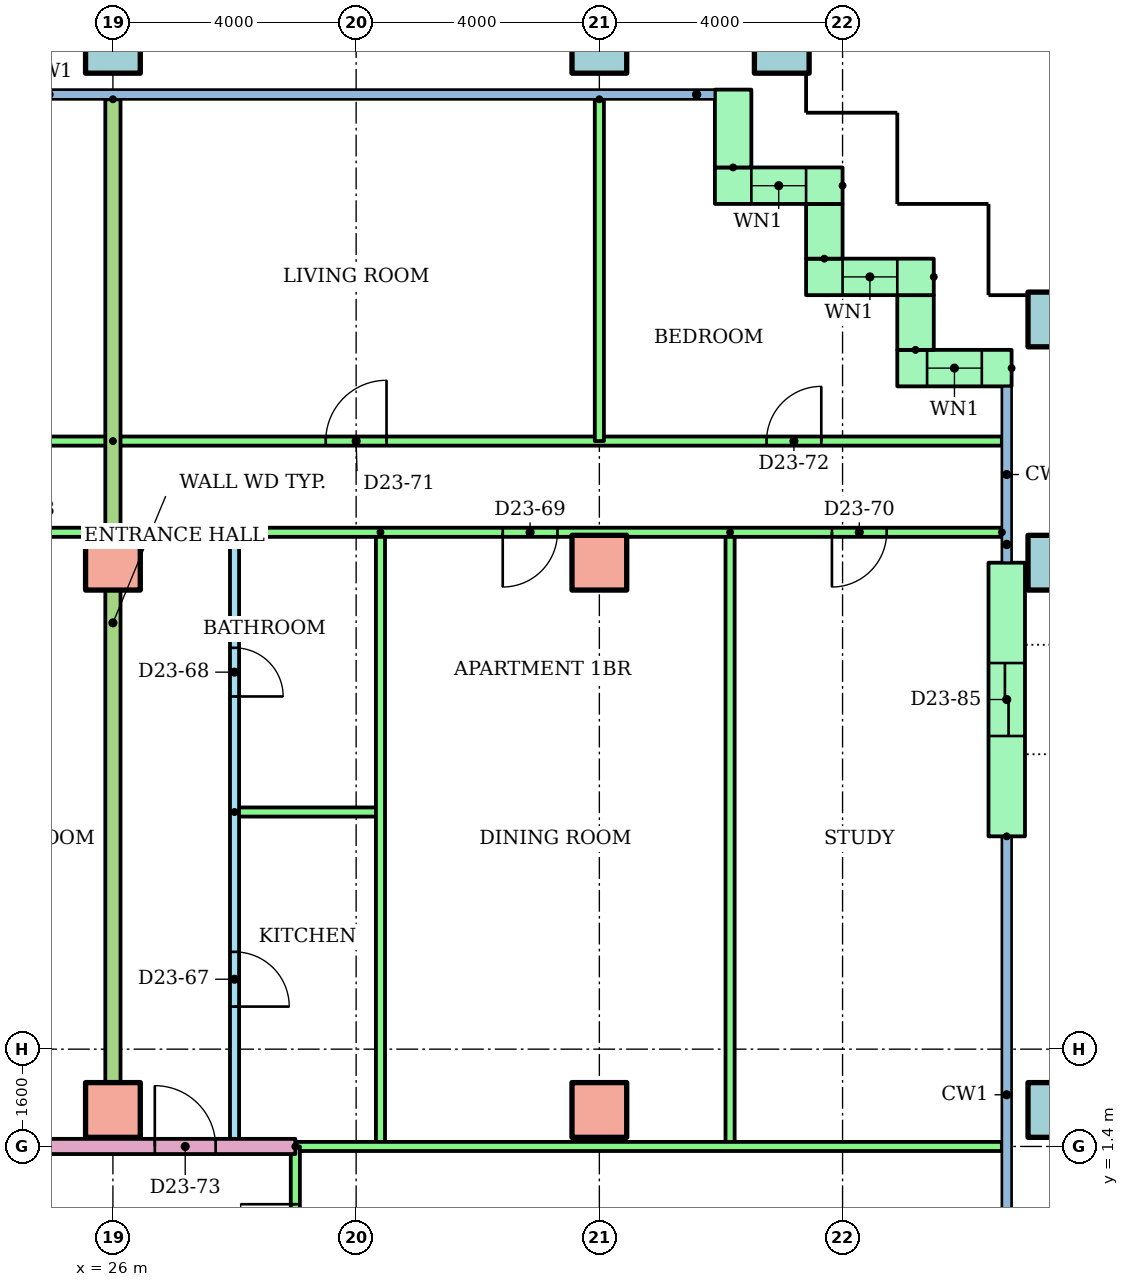
"""IFC4 building model, lengths in metres.
Left out: names, types, materials, properties, quantities, classifications, styles, units other than length and angle.
Written with IfcOpenShell. Run it as: python <this file> out.ifc"""

import sys

from ifc_helpers import new_model, si_unit, direction, frame, frame_2d, origin, origin_2d, place, context, subcontext, project, spatial, rectangle, hollow_rectangle, extrude, element, fill, save


model = new_model("IFC4")
c1 = context("Model", 3, precision=1e-05, world=origin(), true_north=direction((0.0, 1.0)))
c2 = subcontext(c1, "Body", "Model", "MODEL_VIEW")
j1 = project(units=[si_unit("LENGTHUNIT", "METRE"), si_unit("PLANEANGLEUNIT", "RADIAN")], contexts=[c1])
p1 = place(None, origin())
s1 = spatial("IfcSite", under=j1, at=p1, CompositionType="ELEMENT")
p2 = place(p1, origin())
s2 = spatial("IfcBuilding", under=s1, at=p2, CompositionType="ELEMENT")
p3 = place(p2, frame((0.0, 0.0, 90.3)))
s3 = spatial("IfcBuildingStorey", under=s2, at=p3, CompositionType="ELEMENT", Elevation=90.3)
for number, where in (
    (1, (26.0, 2.0, 0.0)),
    (2, (34.0, 2.0, 0.0)),
):
    element("IfcColumn", number, at=place(p3, frame(where)), inside=s3, PredefinedType="COLUMN", context=c2, shape_type="SweptSolid", body=[
        extrude(rectangle(XDim=0.9, YDim=0.9, at=origin_2d()), origin(), (0.0, 0.0, 1.0), 3.2),
    ])
p4 = place(p3, frame((41.5, 2.0, 0.0)))
e3 = element("IfcColumn", 3, at=p4, inside=s3, PredefinedType="COLUMN", context=c2, shape_type="SweptSolid", body=[
    extrude(hollow_rectangle(XDim=0.9, YDim=0.9, WallThickness=0.045, at=origin_2d()), origin(), (0.0, 0.0, 1.0), 3.2),
])
for number, where in (
    (4, (26.0, 11.0, 0.0)),
    (5, (34.0, 11.0, 0.0)),
):
    element("IfcColumn", number, at=place(p3, frame(where)), inside=s3, PredefinedType="COLUMN", context=c2, shape_type="SweptSolid", body=[
        extrude(rectangle(XDim=0.9, YDim=0.9, at=origin_2d()), origin(), (0.0, 0.0, 1.0), 3.2),
    ])
for number, where in (
    (6, (41.5, 11.0, 0.0)),
    (7, (41.5, 15.0, 0.0)),
    (8, (26.0, 19.5, 0.0)),
    (9, (34.0, 19.5, 0.0)),
    (10, (37.0, 19.5, 0.0)),
):
    element("IfcColumn", number, at=place(p3, frame(where)), inside=s3, PredefinedType="COLUMN", context=c2, shape_type="SweptSolid", body=[
        extrude(hollow_rectangle(XDim=0.9, YDim=0.9, WallThickness=0.045, at=origin_2d()), origin(), (0.0, 0.0, 1.0), 3.2),
    ])
p5 = place(p3, frame((40.78, 14.2, 0.0), z_axis=(0.0, 0.0, 1.0), x_axis=(-1.0, 0.0, 0.0)))
e11 = element("IfcWall", 11, at=p5, inside=s3, PredefinedType="STANDARD", context=c2, shape_type="SweptSolid", body=[
    extrude(rectangle(XDim=1.88, YDim=0.6, at=frame_2d((0.94, 0.0))), origin(), (0.0, 0.0, 1.0), 2.92),
])
p6 = place(p5, frame((0.49, 0.0, 0.9)))
e12 = element("IfcOpeningElement", 12, at=p6, cuts=e11, PredefinedType="OPENING", context=c2, shape_type="SweptSolid", body=[
    extrude(rectangle(XDim=0.9, YDim=1.5, at=frame_2d((0.45, 0.75))), frame((0.0, 0.31, 0.0), z_axis=(0.0, -1.0, 0.0), x_axis=(1.0, 0.0, 0.0)), (0.0, 0.0, 1.0), 0.62),
])
p7 = place(p3, frame((39.2, 14.5, 0.0), z_axis=(0.0, 0.0, 1.0), x_axis=(0.0, 1.0, 0.0)))
e13 = element("IfcWall", 13, at=p7, inside=s3, PredefinedType="STANDARD", context=c2, shape_type="SweptSolid", body=[
    extrude(rectangle(XDim=0.9, YDim=0.6, at=frame_2d((0.45, 0.0))), origin(), (0.0, 0.0, 1.0), 2.92),
])
p8 = place(p3, frame((39.5, 15.7, 0.0), z_axis=(0.0, 0.0, 1.0), x_axis=(-1.0, 0.0, 0.0)))
e14 = element("IfcWall", 14, at=p8, inside=s3, PredefinedType="STANDARD", context=c2, shape_type="SweptSolid", body=[
    extrude(rectangle(XDim=2.1, YDim=0.6, at=frame_2d((1.05, 0.0))), origin(), (0.0, 0.0, 1.0), 2.92),
])
p9 = place(p8, frame((0.6, 0.0, 0.9)))
e15 = element("IfcOpeningElement", 15, at=p9, cuts=e14, PredefinedType="OPENING", context=c2, shape_type="SweptSolid", body=[
    extrude(rectangle(XDim=0.9, YDim=1.5, at=frame_2d((0.45, 0.75))), frame((0.0, 0.31, 0.0), z_axis=(0.0, -1.0, 0.0), x_axis=(1.0, 0.0, 0.0)), (0.0, 0.0, 1.0), 0.62),
])
p10 = place(p3, frame((37.7, 16.0, 0.0), z_axis=(0.0, 0.0, 1.0), x_axis=(0.0, 1.0, 0.0)))
e16 = element("IfcWall", 16, at=p10, inside=s3, PredefinedType="STANDARD", context=c2, shape_type="SweptSolid", body=[
    extrude(rectangle(XDim=0.9, YDim=0.6, at=frame_2d((0.45, 0.0))), origin(), (0.0, 0.0, 1.0), 2.92),
])
p11 = place(p3, frame((38.0, 17.2, 0.0), z_axis=(0.0, 0.0, 1.0), x_axis=(-1.0, 0.0, 0.0)))
e17 = element("IfcWall", 17, at=p11, inside=s3, PredefinedType="STANDARD", context=c2, shape_type="SweptSolid", body=[
    extrude(rectangle(XDim=2.1, YDim=0.6, at=frame_2d((1.05, 0.0))), origin(), (0.0, 0.0, 1.0), 2.92),
])
p12 = place(p11, frame((0.6, 0.0, 0.9)))
e18 = element("IfcOpeningElement", 18, at=p12, cuts=e17, PredefinedType="OPENING", context=c2, shape_type="SweptSolid", body=[
    extrude(rectangle(XDim=0.9, YDim=1.5, at=frame_2d((0.45, 0.75))), frame((0.0, 0.31, 0.0), z_axis=(0.0, -1.0, 0.0), x_axis=(1.0, 0.0, 0.0)), (0.0, 0.0, 1.0), 0.62),
])
p13 = place(p3, frame((36.2, 17.5, 0.0), z_axis=(0.0, 0.0, 1.0), x_axis=(0.0, 1.0, 0.0)))
e19 = element("IfcWall", 19, at=p13, inside=s3, PredefinedType="STANDARD", context=c2, shape_type="SweptSolid", body=[
    extrude(rectangle(XDim=1.28, YDim=0.6, at=frame_2d((0.64, 0.0))), origin(), (0.0, 0.0, 1.0), 2.92),
])
p14 = place(p3, frame((40.7, 6.5, 0.0), z_axis=(0.0, 0.0, 1.0), x_axis=(0.0, 1.0, 0.0)))
e20 = element("IfcWall", 20, at=p14, inside=s3, PredefinedType="STANDARD", context=c2, shape_type="SweptSolid", body=[
    extrude(rectangle(XDim=4.5, YDim=0.6, at=frame_2d((2.25, 0.0))), origin(), (0.0, 0.0, 1.0), 2.92),
])
p15 = place(p14, frame((1.65, 0.0, 0.0)))
e21 = element("IfcOpeningElement", 21, at=p15, cuts=e20, PredefinedType="OPENING", context=c2, shape_type="SweptSolid", body=[
    extrude(rectangle(XDim=1.2, YDim=2.1, at=frame_2d((0.6, 1.05))), frame((0.0, 0.31, 0.0), z_axis=(0.0, -1.0, 0.0), x_axis=(1.0, 0.0, 0.0)), (0.0, 0.0, 1.0), 0.62),
])
p16 = place(p3, frame((26.0, 11.5, 0.0), z_axis=(0.0, 0.0, 1.0), x_axis=(-1.0, 0.0, 0.0)))
e22 = element("IfcWall", 22, at=p16, inside=s3, PredefinedType="PARTITIONING", context=c2, shape_type="SweptSolid", body=[
    extrude(rectangle(XDim=10.0, YDim=0.15, at=frame_2d((5.0, 0.0))), origin(), (0.0, 0.0, 1.0), 2.4),
])
p17 = place(p16, frame((4.9, 0.0, 0.0)))
e23 = element("IfcOpeningElement", 23, at=p17, cuts=e22, PredefinedType="OPENING", context=c2, shape_type="SweptSolid", body=[
    extrude(rectangle(XDim=0.9, YDim=2.1, at=frame_2d((0.45, 1.05))), frame((0.0, 0.085, 0.0), z_axis=(0.0, -1.0, 0.0), x_axis=(1.0, 0.0, 0.0)), (0.0, 0.0, 1.0), 0.17),
])
p18 = place(p16, frame((1.1, 0.0, 0.0)))
e24 = element("IfcOpeningElement", 24, at=p18, cuts=e22, PredefinedType="OPENING", context=c2, shape_type="SweptSolid", body=[
    extrude(rectangle(XDim=0.9, YDim=2.1, at=frame_2d((0.45, 1.05))), frame((0.0, 0.085, 0.0), z_axis=(0.0, -1.0, 0.0), x_axis=(1.0, 0.0, 0.0)), (0.0, 0.0, 1.0), 0.17),
])
p19 = place(p3, frame((14.0, 13.0, 0.0)))
e25 = element("IfcWall", 25, at=p19, inside=s3, PredefinedType="PARTITIONING", context=c2, shape_type="SweptSolid", body=[
    extrude(rectangle(XDim=12.0, YDim=0.15, at=frame_2d((6.0, 0.0))), origin(), (0.0, 0.0, 1.0), 2.4),
])
p20 = place(p19, frame((1.5, 0.0, 0.0)))
e26 = element("IfcOpeningElement", 26, at=p20, cuts=e25, PredefinedType="OPENING", context=c2, shape_type="SweptSolid", body=[
    extrude(rectangle(XDim=1.0, YDim=2.1, at=frame_2d((0.5, 1.05))), frame((0.0, 0.085, 0.0), z_axis=(0.0, -1.0, 0.0), x_axis=(1.0, 0.0, 0.0)), (0.0, 0.0, 1.0), 0.17),
])
p21 = place(p19, frame((7.55, 0.0, 0.0)))
e27 = element("IfcOpeningElement", 27, at=p21, cuts=e25, PredefinedType="OPENING", context=c2, shape_type="SweptSolid", body=[
    extrude(rectangle(XDim=0.9, YDim=2.1, at=frame_2d((0.45, 1.05))), frame((0.0, 0.085, 0.0), z_axis=(0.0, -1.0, 0.0), x_axis=(1.0, 0.0, 0.0)), (0.0, 0.0, 1.0), 0.17),
])
p22 = place(p3, frame((28.0, 11.5, 0.0), z_axis=(0.0, 0.0, 1.0), x_axis=(0.0, -1.0, 0.0)))
e28 = element("IfcWall", 28, at=p22, inside=s3, PredefinedType="PARTITIONING", context=c2, shape_type="SweptSolid", body=[
    extrude(rectangle(XDim=10.1, YDim=0.15, at=frame_2d((5.05, 0.0))), origin(), (0.0, 0.0, 1.0), 2.4),
])
p23 = place(p22, frame((6.9, 0.0, 0.0)))
e29 = element("IfcOpeningElement", 29, at=p23, cuts=e28, PredefinedType="OPENING", context=c2, shape_type="SweptSolid", body=[
    extrude(rectangle(XDim=0.9, YDim=2.1, at=frame_2d((0.45, 1.05))), frame((0.0, 0.085, 0.0), z_axis=(0.0, -1.0, 0.0), x_axis=(1.0, 0.0, 0.0)), (0.0, 0.0, 1.0), 0.17),
])
p24 = place(p22, frame((1.9, 0.0, 0.0)))
e30 = element("IfcOpeningElement", 30, at=p24, cuts=e28, PredefinedType="OPENING", context=c2, shape_type="SweptSolid", body=[
    extrude(rectangle(XDim=0.8, YDim=2.1, at=frame_2d((0.4, 1.05))), frame((0.0, 0.085, 0.0), z_axis=(0.0, -1.0, 0.0), x_axis=(1.0, 0.0, 0.0)), (0.0, 0.0, 1.0), 0.17),
])
p25 = place(p3, frame((28.0, 6.9, 0.0)))
e31 = element("IfcWall", 31, at=p25, inside=s3, PredefinedType="PARTITIONING", context=c2, shape_type="SweptSolid", body=[
    extrude(rectangle(XDim=2.4, YDim=0.15, at=frame_2d((1.2, 0.0))), origin(), (0.0, 0.0, 1.0), 2.4),
])
for number, where, z_axis, x_axis in (
    (32, (30.4, 11.5, 0.0), (0.0, 0.0, 1.0), (0.0, -1.0, 0.0)),
    (33, (36.15, 11.5, 0.0), (0.0, 0.0, 1.0), (0.0, -1.0, 0.0)),
):
    element("IfcWall", number, at=place(p3, frame(where, z_axis=z_axis, x_axis=x_axis)), inside=s3, PredefinedType="PARTITIONING", context=c2, shape_type="SweptSolid", body=[
        extrude(rectangle(XDim=10.1, YDim=0.15, at=frame_2d((5.05, 0.0))), origin(), (0.0, 0.0, 1.0), 2.4),
    ])
p26 = place(p3, frame((40.62, 11.5, 0.0), z_axis=(0.0, 0.0, 1.0), x_axis=(-1.0, 0.0, 0.0)))
e34 = element("IfcWall", 34, at=p26, inside=s3, PredefinedType="PARTITIONING", context=c2, shape_type="SweptSolid", body=[
    extrude(rectangle(XDim=12.62, YDim=0.15, at=frame_2d((6.31, 0.0))), origin(), (0.0, 0.0, 1.0), 2.4),
])
p27 = place(p26, frame((7.309, 0.0, 0.0)))
e35 = element("IfcOpeningElement", 35, at=p27, cuts=e34, PredefinedType="OPENING", context=c2, shape_type="SweptSolid", body=[
    extrude(rectangle(XDim=0.9, YDim=2.1, at=frame_2d((0.45, 1.05))), frame((0.0, 0.085, 0.0), z_axis=(0.0, -1.0, 0.0), x_axis=(1.0, 0.0, 0.0)), (0.0, 0.0, 1.0), 0.17),
])
p28 = place(p26, frame((1.895, 0.0, 0.0)))
e36 = element("IfcOpeningElement", 36, at=p28, cuts=e34, PredefinedType="OPENING", context=c2, shape_type="SweptSolid", body=[
    extrude(rectangle(XDim=0.9, YDim=2.1, at=frame_2d((0.45, 1.05))), frame((0.0, 0.085, 0.0), z_axis=(0.0, -1.0, 0.0), x_axis=(1.0, 0.0, 0.0)), (0.0, 0.0, 1.0), 0.17),
])
p29 = place(p3, frame((26.0, 13.0, 0.0)))
e37 = element("IfcWall", 37, at=p29, inside=s3, PredefinedType="PARTITIONING", context=c2, shape_type="SweptSolid", body=[
    extrude(rectangle(XDim=14.62, YDim=0.15, at=frame_2d((7.31, 0.0))), origin(), (0.0, 0.0, 1.0), 2.4),
])
p30 = place(p29, frame((3.5, 0.0, 0.0)))
e38 = element("IfcOpeningElement", 38, at=p30, cuts=e37, PredefinedType="OPENING", context=c2, shape_type="SweptSolid", body=[
    extrude(rectangle(XDim=1.0, YDim=2.1, at=frame_2d((0.5, 1.05))), frame((0.0, 0.085, 0.0), z_axis=(0.0, -1.0, 0.0), x_axis=(1.0, 0.0, 0.0)), (0.0, 0.0, 1.0), 0.17),
])
p31 = place(p29, frame((10.75, 0.0, 0.0)))
e39 = element("IfcOpeningElement", 39, at=p31, cuts=e37, PredefinedType="OPENING", context=c2, shape_type="SweptSolid", body=[
    extrude(rectangle(XDim=0.9, YDim=2.1, at=frame_2d((0.45, 1.05))), frame((0.0, 0.085, 0.0), z_axis=(0.0, -1.0, 0.0), x_axis=(1.0, 0.0, 0.0)), (0.0, 0.0, 1.0), 0.17),
])
p32 = place(p3, frame((34.0, 18.621, 0.0), z_axis=(0.0, 0.0, 1.0), x_axis=(0.0, -1.0, 0.0)))
e40 = element("IfcWall", 40, at=p32, inside=s3, PredefinedType="PARTITIONING", context=c2, shape_type="SweptSolid", body=[
    extrude(rectangle(XDim=5.621, YDim=0.15, at=frame_2d((2.811, 0.0))), origin(), (0.0, 0.0, 1.0), 2.4),
])
p33 = place(p3, frame((26.0, 18.621, 0.0), z_axis=(0.0, 0.0, 1.0), x_axis=(0.0, -1.0, 0.0)))
e41 = element("IfcWall", 41, at=p33, inside=s3, PredefinedType="PARTITIONING", context=c2, shape_type="SweptSolid", body=[
    extrude(rectangle(XDim=17.221, YDim=0.25, at=frame_2d((8.611, 0.0))), origin(), (0.0, 0.0, 1.0), 2.4),
])
p34 = place(p3, frame((14.0, 1.4, 0.0)))
e42 = element("IfcWall", 42, at=p34, inside=s3, PredefinedType="PARTITIONING", context=c2, shape_type="SweptSolid", body=[
    extrude(rectangle(XDim=15.0, YDim=0.25, at=frame_2d((7.5, 0.0))), origin(), (0.0, 0.0, 1.0), 2.4),
])
p35 = place(p34, frame((0.5, 0.0, 0.0)))
e43 = element("IfcOpeningElement", 43, at=p35, cuts=e42, PredefinedType="OPENING", context=c2, shape_type="SweptSolid", body=[
    extrude(rectangle(XDim=1.0, YDim=2.1, at=frame_2d((0.5, 1.05))), frame((0.0, 0.135, 0.0), z_axis=(0.0, -1.0, 0.0), x_axis=(1.0, 0.0, 0.0)), (0.0, 0.0, 1.0), 0.27),
])
p36 = place(p34, frame((12.689, 0.0, 0.0)))
e44 = element("IfcOpeningElement", 44, at=p36, cuts=e42, PredefinedType="OPENING", context=c2, shape_type="SweptSolid", body=[
    extrude(rectangle(XDim=1.0, YDim=2.1, at=frame_2d((0.5, 1.05))), frame((0.0, 0.135, 0.0), z_axis=(0.0, -1.0, 0.0), x_axis=(1.0, 0.0, 0.0)), (0.0, 0.0, 1.0), 0.27),
])
p37 = place(p3, frame((29.0, 1.4, 0.0)))
e45 = element("IfcWall", 45, at=p37, inside=s3, PredefinedType="PARTITIONING", context=c2, shape_type="SweptSolid", body=[
    extrude(rectangle(XDim=11.62, YDim=0.15, at=frame_2d((5.81, 0.0))), origin(), (0.0, 0.0, 1.0), 2.4),
])
p38 = place(p3, frame((29.0, -1.4, 0.0), z_axis=(0.0, 0.0, 1.0), x_axis=(0.0, 1.0, 0.0)))
e46 = element("IfcWall", 46, at=p38, inside=s3, PredefinedType="PARTITIONING", context=c2, shape_type="SweptSolid", body=[
    extrude(rectangle(XDim=2.8, YDim=0.15, at=frame_2d((1.4, 0.0))), origin(), (0.0, 0.0, 1.0), 2.4),
])
p39 = place(p38, frame((0.95, 0.0, 0.0)))
e47 = element("IfcOpeningElement", 47, at=p39, cuts=e46, PredefinedType="OPENING", context=c2, shape_type="SweptSolid", body=[
    extrude(rectangle(XDim=0.9, YDim=2.1, at=frame_2d((0.45, 1.05))), frame((0.0, 0.085, 0.0), z_axis=(0.0, -1.0, 0.0), x_axis=(1.0, 0.0, 0.0)), (0.0, 0.0, 1.0), 0.17),
])
p40 = place(p6, origin())
e48 = element("IfcWindow", 48, at=p40, inside=s3, PartitioningType="SINGLE_PANEL", PredefinedType="WINDOW", context=c2, shape_type="SweptSolid", body=[
    extrude(rectangle(XDim=0.9, YDim=1.5, at=frame_2d((0.45, 0.75))), frame((0.0, 0.03, 0.0), z_axis=(0.0, -1.0, 0.0), x_axis=(1.0, 0.0, 0.0)), (0.0, 0.0, 1.0), 0.06),
])
fill(e12, e48)
p41 = place(p9, origin())
e49 = element("IfcWindow", 49, at=p41, inside=s3, PartitioningType="SINGLE_PANEL", PredefinedType="WINDOW", context=c2, shape_type="SweptSolid", body=[
    extrude(rectangle(XDim=0.9, YDim=1.5, at=frame_2d((0.45, 0.75))), frame((0.0, 0.03, 0.0), z_axis=(0.0, -1.0, 0.0), x_axis=(1.0, 0.0, 0.0)), (0.0, 0.0, 1.0), 0.06),
])
fill(e15, e49)
p42 = place(p12, origin())
e50 = element("IfcWindow", 50, at=p42, inside=s3, PartitioningType="SINGLE_PANEL", PredefinedType="WINDOW", context=c2, shape_type="SweptSolid", body=[
    extrude(rectangle(XDim=0.9, YDim=1.5, at=frame_2d((0.45, 0.75))), frame((0.0, 0.03, 0.0), z_axis=(0.0, -1.0, 0.0), x_axis=(1.0, 0.0, 0.0)), (0.0, 0.0, 1.0), 0.06),
])
fill(e18, e50)
p43 = place(p23, origin())
e51 = element("IfcDoor", 51, at=p43, inside=s3, OperationType="SINGLE_SWING_RIGHT", PredefinedType="DOOR", context=c2, shape_type="SweptSolid", body=[
    extrude(rectangle(XDim=0.9, YDim=2.1, at=frame_2d((0.45, 1.05))), frame((0.0, 0.025, 0.0), z_axis=(0.0, -1.0, 0.0), x_axis=(1.0, 0.0, 0.0)), (0.0, 0.0, 1.0), 0.05),
])
fill(e29, e51)
p44 = place(p24, origin())
e52 = element("IfcDoor", 52, at=p44, inside=s3, OperationType="SINGLE_SWING_RIGHT", PredefinedType="DOOR", context=c2, shape_type="SweptSolid", body=[
    extrude(rectangle(XDim=0.8, YDim=2.1, at=frame_2d((0.4, 1.05))), frame((0.0, 0.025, 0.0), z_axis=(0.0, -1.0, 0.0), x_axis=(1.0, 0.0, 0.0)), (0.0, 0.0, 1.0), 0.05),
])
fill(e30, e52)
p45 = place(p27, origin())
e53 = element("IfcDoor", 53, at=p45, inside=s3, OperationType="SINGLE_SWING_RIGHT", PredefinedType="DOOR", context=c2, shape_type="SweptSolid", body=[
    extrude(rectangle(XDim=0.9, YDim=2.1, at=frame_2d((0.45, 1.05))), frame((0.0, 0.025, 0.0), z_axis=(0.0, -1.0, 0.0), x_axis=(1.0, 0.0, 0.0)), (0.0, 0.0, 1.0), 0.05),
])
fill(e35, e53)
p46 = place(p28, origin())
e54 = element("IfcDoor", 54, at=p46, inside=s3, OperationType="SINGLE_SWING_RIGHT", PredefinedType="DOOR", context=c2, shape_type="SweptSolid", body=[
    extrude(rectangle(XDim=0.9, YDim=2.1, at=frame_2d((0.45, 1.05))), frame((0.0, 0.025, 0.0), z_axis=(0.0, -1.0, 0.0), x_axis=(1.0, 0.0, 0.0)), (0.0, 0.0, 1.0), 0.05),
])
fill(e36, e54)
p47 = place(p30, origin())
e55 = element("IfcDoor", 55, at=p47, inside=s3, OperationType="SINGLE_SWING_RIGHT", PredefinedType="DOOR", context=c2, shape_type="SweptSolid", body=[
    extrude(rectangle(XDim=1.0, YDim=2.1, at=frame_2d((0.5, 1.05))), frame((0.0, 0.025, 0.0), z_axis=(0.0, -1.0, 0.0), x_axis=(1.0, 0.0, 0.0)), (0.0, 0.0, 1.0), 0.05),
])
fill(e38, e55)
p48 = place(p31, origin())
e56 = element("IfcDoor", 56, at=p48, inside=s3, OperationType="SINGLE_SWING_RIGHT", PredefinedType="DOOR", context=c2, shape_type="SweptSolid", body=[
    extrude(rectangle(XDim=0.9, YDim=2.1, at=frame_2d((0.45, 1.05))), frame((0.0, 0.025, 0.0), z_axis=(0.0, -1.0, 0.0), x_axis=(1.0, 0.0, 0.0)), (0.0, 0.0, 1.0), 0.05),
])
fill(e39, e56)
p49 = place(p36, origin())
e57 = element("IfcDoor", 57, at=p49, inside=s3, OperationType="SINGLE_SWING_LEFT", PredefinedType="DOOR", context=c2, shape_type="SweptSolid", body=[
    extrude(rectangle(XDim=1.0, YDim=2.1, at=frame_2d((0.5, 1.05))), frame((0.0, 0.025, 0.0), z_axis=(0.0, -1.0, 0.0), x_axis=(1.0, 0.0, 0.0)), (0.0, 0.0, 1.0), 0.05),
])
fill(e44, e57)
p50 = place(p39, origin())
e58 = element("IfcDoor", 58, at=p50, inside=s3, OperationType="SINGLE_SWING_RIGHT", PredefinedType="DOOR", context=c2, shape_type="SweptSolid", body=[
    extrude(rectangle(XDim=0.9, YDim=2.1, at=frame_2d((0.45, 1.05))), frame((0.0, 0.025, 0.0), z_axis=(0.0, -1.0, 0.0), x_axis=(1.0, 0.0, 0.0)), (0.0, 0.0, 1.0), 0.05),
])
fill(e47, e58)
p51 = place(p15, origin())
e59 = element("IfcDoor", 59, at=p51, inside=s3, OperationType="SLIDING_TO_LEFT", PredefinedType="DOOR", context=c2, shape_type="SweptSolid", body=[
    extrude(rectangle(XDim=1.2, YDim=2.1, at=frame_2d((0.6, 1.05))), frame((0.0, 0.025, 0.0), z_axis=(0.0, -1.0, 0.0), x_axis=(1.0, 0.0, 0.0)), (0.0, 0.0, 1.0), 0.05),
])
fill(e21, e59)
save(model, sys.argv[1])
